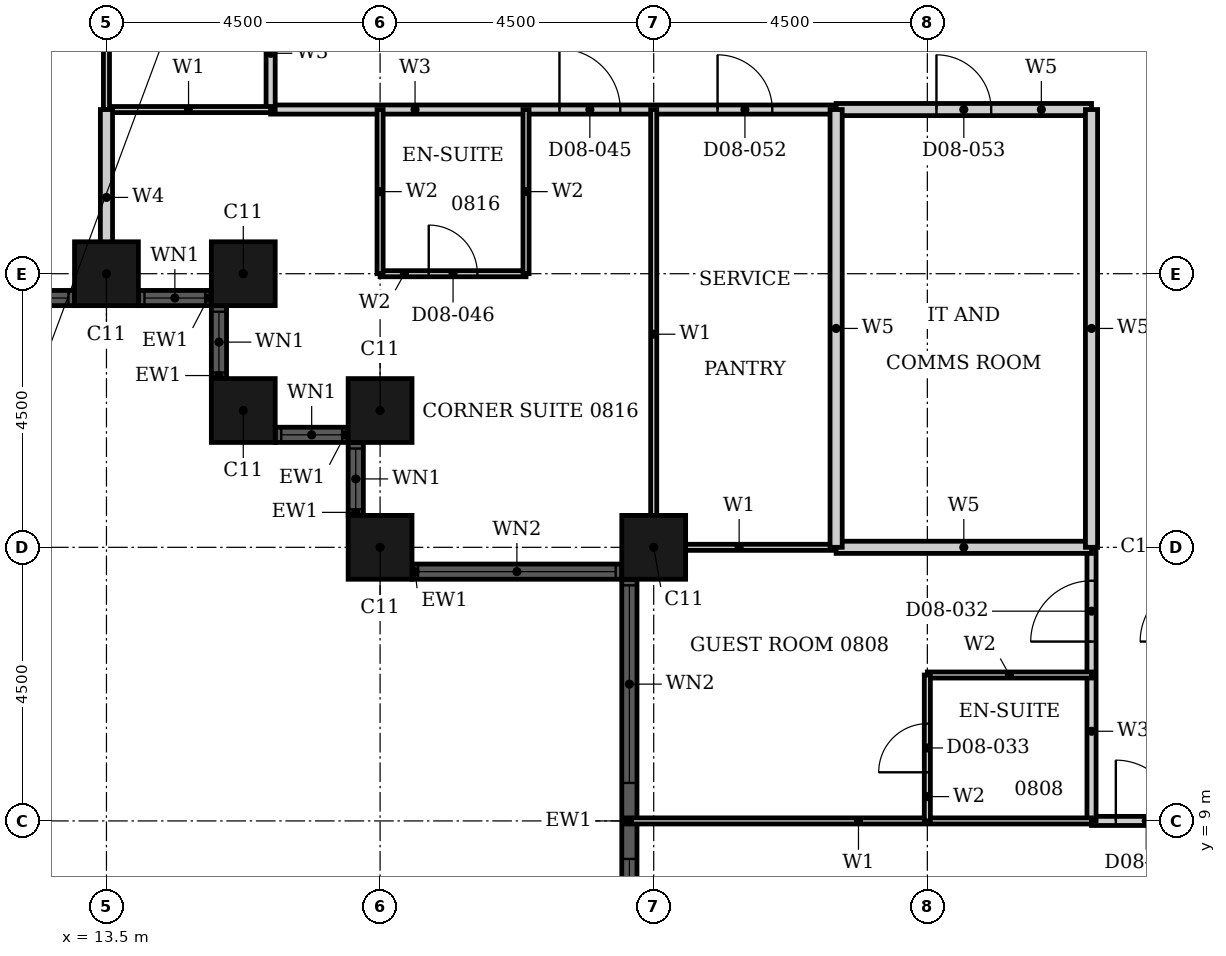
"""IFC4 building model, lengths in metres.
Left out: names, types, materials, properties, quantities, classifications, styles, units other than length and angle.
Written with IfcOpenShell. Run it as: python <this file> out.ifc"""

import sys

from ifc_helpers import new_model, si_unit, direction, frame, frame_2d, origin, origin_2d, place, context, subcontext, project, spatial, rectangle, hollow_rectangle, extrude, element, fill, save


model = new_model("IFC4")
c1 = context("Model", 3, precision=1e-05, world=origin(), true_north=direction((0.0, 1.0)))
c2 = subcontext(c1, "Body", "Model", "MODEL_VIEW")
j1 = project(units=[si_unit("LENGTHUNIT", "METRE"), si_unit("PLANEANGLEUNIT", "RADIAN")], contexts=[c1])
p1 = place(None, origin())
s1 = spatial("IfcSite", under=j1, at=p1, CompositionType="ELEMENT")
p2 = place(p1, origin())
s2 = spatial("IfcBuilding", under=s1, at=p2, CompositionType="ELEMENT")
p3 = place(p2, frame((0.0, 0.0, 40.8)))
s3 = spatial("IfcBuildingStorey", under=s2, at=p3, CompositionType="ELEMENT", Elevation=40.8)
for number, where, z_axis, x_axis in (
    (1, (13.5, 18.0, 0.0), (0.0, 0.0, 1.0), (1.0, 0.0, 0.0)),
    (2, (15.75, 18.0, 0.0), (0.0, 0.0, 1.0), (1.0, 0.0, 0.0)),
    (3, (15.75, 15.75, 0.0), (0.0, 0.0, 1.0), (1.0, 0.0, 0.0)),
    (4, (18.0, 15.75, 0.0), (0.0, 0.0, 1.0), (1.0, 0.0, 0.0)),
    (5, (18.0, 13.5, 0.0), (0.0, 0.0, 1.0), (1.0, 0.0, 0.0)),
    (6, (22.5, 13.5, 0.0), (0.0, 0.0, 1.0), (1.0, 0.0, 0.0)),
):
    element("IfcColumn", number, at=place(p3, frame(where, z_axis=z_axis, x_axis=x_axis)), inside=s3, PredefinedType="COLUMN", context=c2, shape_type="SweptSolid", body=[
        extrude(hollow_rectangle(XDim=1.05, YDim=1.05, WallThickness=0.034, at=origin_2d()), origin(), (0.0, 0.0, 1.0), 3.6),
    ])
p4 = place(p3, frame((5.025, 17.6, 0.0), z_axis=(0.0, 0.0, 1.0), x_axis=(1.0, 0.0, 0.0)))
e7 = element("IfcWall", 7, at=p4, inside=s3, PredefinedType="SOLIDWALL", context=c2, shape_type="SweptSolid", body=[
    extrude(rectangle(XDim=7.95, YDim=0.25, at=frame_2d((3.975, 0.0))), origin(), (0.0, 0.0, 1.0), 3.6),
])
p5 = place(p4, frame((0.1, 0.0, 0.9)))
e8 = element("IfcOpeningElement", 8, at=p5, cuts=e7, PredefinedType="OPENING", context=c2, shape_type="SweptSolid", body=[
    extrude(rectangle(XDim=3.25, YDim=2.08, at=frame_2d((1.625, 1.04))), frame((0.0, 0.135, 0.0), z_axis=(0.0, -1.0, 0.0), x_axis=(1.0, 0.0, 0.0)), (0.0, 0.0, 1.0), 0.27),
])
p6 = place(p4, frame((4.6, 0.0, 0.9)))
e9 = element("IfcOpeningElement", 9, at=p6, cuts=e7, PredefinedType="OPENING", context=c2, shape_type="SweptSolid", body=[
    extrude(rectangle(XDim=3.25, YDim=2.08, at=frame_2d((1.625, 1.04))), frame((0.0, 0.135, 0.0), z_axis=(0.0, -1.0, 0.0), x_axis=(1.0, 0.0, 0.0)), (0.0, 0.0, 1.0), 0.27),
])
p7 = place(p3, frame((14.025, 17.6, 0.0), z_axis=(0.0, 0.0, 1.0), x_axis=(1.0, 0.0, 0.0)))
e10 = element("IfcWall", 10, at=p7, inside=s3, PredefinedType="SOLIDWALL", context=c2, shape_type="SweptSolid", body=[
    extrude(rectangle(XDim=1.2, YDim=0.25, at=frame_2d((0.6, 0.0))), origin(), (0.0, 0.0, 1.0), 3.6),
])
p8 = place(p7, frame((0.1, 0.0, 0.9)))
e11 = element("IfcOpeningElement", 11, at=p8, cuts=e10, PredefinedType="OPENING", context=c2, shape_type="SweptSolid", body=[
    extrude(rectangle(XDim=1.0, YDim=2.08, at=frame_2d((0.5, 1.04))), frame((0.0, 0.135, 0.0), z_axis=(0.0, -1.0, 0.0), x_axis=(1.0, 0.0, 0.0)), (0.0, 0.0, 1.0), 0.27),
])
p9 = place(p3, frame((15.35, 17.475, 0.0), z_axis=(0.0, 0.0, 1.0), x_axis=(0.0, -1.0, 0.0)))
e12 = element("IfcWall", 12, at=p9, inside=s3, PredefinedType="SOLIDWALL", context=c2, shape_type="SweptSolid", body=[
    extrude(rectangle(XDim=1.2, YDim=0.25, at=frame_2d((0.6, 0.0))), origin(), (0.0, 0.0, 1.0), 3.6),
])
p10 = place(p9, frame((0.1, 0.0, 0.9)))
e13 = element("IfcOpeningElement", 13, at=p10, cuts=e12, PredefinedType="OPENING", context=c2, shape_type="SweptSolid", body=[
    extrude(rectangle(XDim=1.0, YDim=2.08, at=frame_2d((0.5, 1.04))), frame((0.0, 0.135, 0.0), z_axis=(0.0, -1.0, 0.0), x_axis=(1.0, 0.0, 0.0)), (0.0, 0.0, 1.0), 0.27),
])
p11 = place(p3, frame((16.275, 15.35, 0.0), z_axis=(0.0, 0.0, 1.0), x_axis=(1.0, 0.0, 0.0)))
e14 = element("IfcWall", 14, at=p11, inside=s3, PredefinedType="SOLIDWALL", context=c2, shape_type="SweptSolid", body=[
    extrude(rectangle(XDim=1.2, YDim=0.25, at=frame_2d((0.6, 0.0))), origin(), (0.0, 0.0, 1.0), 3.6),
])
p12 = place(p11, frame((0.1, 0.0, 0.9)))
e15 = element("IfcOpeningElement", 15, at=p12, cuts=e14, PredefinedType="OPENING", context=c2, shape_type="SweptSolid", body=[
    extrude(rectangle(XDim=1.0, YDim=2.08, at=frame_2d((0.5, 1.04))), frame((0.0, 0.135, 0.0), z_axis=(0.0, -1.0, 0.0), x_axis=(1.0, 0.0, 0.0)), (0.0, 0.0, 1.0), 0.27),
])
p13 = place(p3, frame((17.6, 15.225, 0.0), z_axis=(0.0, 0.0, 1.0), x_axis=(0.0, -1.0, 0.0)))
e16 = element("IfcWall", 16, at=p13, inside=s3, PredefinedType="SOLIDWALL", context=c2, shape_type="SweptSolid", body=[
    extrude(rectangle(XDim=1.2, YDim=0.25, at=frame_2d((0.6, 0.0))), origin(), (0.0, 0.0, 1.0), 3.6),
])
p14 = place(p13, frame((0.1, 0.0, 0.9)))
e17 = element("IfcOpeningElement", 17, at=p14, cuts=e16, PredefinedType="OPENING", context=c2, shape_type="SweptSolid", body=[
    extrude(rectangle(XDim=1.0, YDim=2.08, at=frame_2d((0.5, 1.04))), frame((0.0, 0.135, 0.0), z_axis=(0.0, -1.0, 0.0), x_axis=(1.0, 0.0, 0.0)), (0.0, 0.0, 1.0), 0.27),
])
p15 = place(p3, frame((18.525, 13.1, 0.0), z_axis=(0.0, 0.0, 1.0), x_axis=(1.0, 0.0, 0.0)))
e18 = element("IfcWall", 18, at=p15, inside=s3, PredefinedType="SOLIDWALL", context=c2, shape_type="SweptSolid", body=[
    extrude(rectangle(XDim=3.45, YDim=0.25, at=frame_2d((1.725, 0.0))), origin(), (0.0, 0.0, 1.0), 3.6),
])
p16 = place(p15, frame((0.1, 0.0, 0.9)))
e19 = element("IfcOpeningElement", 19, at=p16, cuts=e18, PredefinedType="OPENING", context=c2, shape_type="SweptSolid", body=[
    extrude(rectangle(XDim=3.25, YDim=2.08, at=frame_2d((1.625, 1.04))), frame((0.0, 0.135, 0.0), z_axis=(0.0, -1.0, 0.0), x_axis=(1.0, 0.0, 0.0)), (0.0, 0.0, 1.0), 0.27),
])
p17 = place(p3, frame((22.1, 12.975, 0.0), z_axis=(0.0, 0.0, 1.0), x_axis=(0.0, -1.0, 0.0)))
e20 = element("IfcWall", 20, at=p17, inside=s3, PredefinedType="SOLIDWALL", context=c2, shape_type="SweptSolid", body=[
    extrude(rectangle(XDim=7.95, YDim=0.25, at=frame_2d((3.975, 0.0))), origin(), (0.0, 0.0, 1.0), 3.6),
])
p18 = place(p17, frame((0.1, 0.0, 0.9)))
e21 = element("IfcOpeningElement", 21, at=p18, cuts=e20, PredefinedType="OPENING", context=c2, shape_type="SweptSolid", body=[
    extrude(rectangle(XDim=3.25, YDim=2.08, at=frame_2d((1.625, 1.04))), frame((0.0, 0.135, 0.0), z_axis=(0.0, -1.0, 0.0), x_axis=(1.0, 0.0, 0.0)), (0.0, 0.0, 1.0), 0.27),
])
p19 = place(p17, frame((4.6, 0.0, 0.9)))
e22 = element("IfcOpeningElement", 22, at=p19, cuts=e20, PredefinedType="OPENING", context=c2, shape_type="SweptSolid", body=[
    extrude(rectangle(XDim=3.25, YDim=2.08, at=frame_2d((1.625, 1.04))), frame((0.0, 0.135, 0.0), z_axis=(0.0, -1.0, 0.0), x_axis=(1.0, 0.0, 0.0)), (0.0, 0.0, 1.0), 0.27),
])
p20 = place(p3, frame((16.2, 20.7, 0.0), z_axis=(0.0, 0.0, 1.0), x_axis=(1.0, 0.0, 0.0)))
e23 = element("IfcWall", 23, at=p20, inside=s3, PredefinedType="PARTITIONING", context=c2, shape_type="SweptSolid", body=[
    extrude(rectangle(XDim=9.3, YDim=0.15, at=frame_2d((4.65, 0.0))), origin(), (0.0, 0.0, 1.0), 3.3),
])
p21 = place(p20, frame((4.75, 0.0, 0.0)))
e24 = element("IfcOpeningElement", 24, at=p21, cuts=e23, PredefinedType="OPENING", context=c2, shape_type="SweptSolid", body=[
    extrude(rectangle(XDim=1.0, YDim=2.1, at=frame_2d((0.5, 1.05))), frame((0.0, 0.085, 0.0), z_axis=(0.0, -1.0, 0.0), x_axis=(1.0, 0.0, 0.0)), (0.0, 0.0, 1.0), 0.17),
])
p22 = place(p20, frame((7.35, 0.0, 0.0)))
e25 = element("IfcOpeningElement", 25, at=p22, cuts=e23, PredefinedType="OPENING", context=c2, shape_type="SweptSolid", body=[
    extrude(rectangle(XDim=0.9, YDim=2.1, at=frame_2d((0.45, 1.05))), frame((0.0, 0.085, 0.0), z_axis=(0.0, -1.0, 0.0), x_axis=(1.0, 0.0, 0.0)), (0.0, 0.0, 1.0), 0.17),
])
p23 = place(p3, frame((29.7, 9.0, 0.0), z_axis=(0.0, 0.0, 1.0), x_axis=(1.0, 0.0, 0.0)))
e26 = element("IfcWall", 26, at=p23, inside=s3, PredefinedType="PARTITIONING", context=c2, shape_type="SweptSolid", body=[
    extrude(rectangle(XDim=1.8, YDim=0.15, at=frame_2d((0.9, 0.0))), origin(), (0.0, 0.0, 1.0), 3.3),
])
p24 = place(p23, frame((0.4, 0.0, 0.0)))
e27 = element("IfcOpeningElement", 27, at=p24, cuts=e26, PredefinedType="OPENING", context=c2, shape_type="SweptSolid", body=[
    extrude(rectangle(XDim=1.0, YDim=2.1, at=frame_2d((0.5, 1.05))), frame((0.0, 0.085, 0.0), z_axis=(0.0, -1.0, 0.0), x_axis=(1.0, 0.0, 0.0)), (0.0, 0.0, 1.0), 0.17),
])
p25 = place(p3, frame((16.2, 20.7, 0.0), z_axis=(0.0, 0.0, 1.0), x_axis=(0.0, 1.0, 0.0)))
e28 = element("IfcWall", 28, at=p25, inside=s3, PredefinedType="PARTITIONING", context=c2, shape_type="SweptSolid", body=[
    extrude(rectangle(XDim=4.5, YDim=0.15, at=frame_2d((2.25, 0.0))), origin(), (0.0, 0.0, 1.0), 3.3),
])
p26 = place(p25, frame((1.85, 0.0, 0.0)))
e29 = element("IfcOpeningElement", 29, at=p26, cuts=e28, PredefinedType="OPENING", context=c2, shape_type="SweptSolid", body=[
    extrude(rectangle(XDim=0.9, YDim=2.1, at=frame_2d((0.45, 1.05))), frame((0.0, 0.085, 0.0), z_axis=(0.0, -1.0, 0.0), x_axis=(1.0, 0.0, 0.0)), (0.0, 0.0, 1.0), 0.17),
])
p27 = place(p3, frame((29.7, 9.0, 0.0), z_axis=(0.0, 0.0, 1.0), x_axis=(0.0, 1.0, 0.0)))
e30 = element("IfcWall", 30, at=p27, inside=s3, PredefinedType="PARTITIONING", context=c2, shape_type="SweptSolid", body=[
    extrude(rectangle(XDim=4.5, YDim=0.15, at=frame_2d((2.25, 0.0))), origin(), (0.0, 0.0, 1.0), 3.3),
])
p28 = place(p27, frame((2.95, 0.0, 0.0)))
e31 = element("IfcOpeningElement", 31, at=p28, cuts=e30, PredefinedType="OPENING", context=c2, shape_type="SweptSolid", body=[
    extrude(rectangle(XDim=1.0, YDim=2.1, at=frame_2d((0.5, 1.05))), frame((0.0, 0.085, 0.0), z_axis=(0.0, -1.0, 0.0), x_axis=(1.0, 0.0, 0.0)), (0.0, 0.0, 1.0), 0.17),
])
p29 = place(p3, frame((22.31, 13.5, 0.0), z_axis=(0.0, 0.0, 1.0), x_axis=(1.0, 0.0, 0.0)))
e32 = element("IfcWall", 32, at=p29, inside=s3, PredefinedType="PARTITIONING", context=c2, shape_type="SweptSolid", body=[
    extrude(rectangle(XDim=3.19, YDim=0.1, at=frame_2d((1.595, 0.0))), origin(), (0.0, 0.0, 1.0), 2.38),
])
p30 = place(p3, frame((13.5, 20.7, 0.0), z_axis=(0.0, 0.0, 1.0), x_axis=(1.0, 0.0, 0.0)))
e33 = element("IfcWall", 33, at=p30, inside=s3, PredefinedType="PARTITIONING", context=c2, shape_type="SweptSolid", body=[
    extrude(rectangle(XDim=2.7, YDim=0.1, at=frame_2d((1.35, 0.0))), origin(), (0.0, 0.0, 1.0), 3.3),
])
p31 = place(p3, frame((22.035, 9.0, 0.0), z_axis=(0.0, 0.0, 1.0), x_axis=(1.0, 0.0, 0.0)))
e34 = element("IfcWall", 34, at=p31, inside=s3, PredefinedType="PARTITIONING", context=c2, shape_type="SweptSolid", body=[
    extrude(rectangle(XDim=7.665, YDim=0.1, at=frame_2d((3.833, 0.0))), origin(), (0.0, 0.0, 1.0), 3.3),
])
p32 = place(p3, frame((13.5, 20.7, 0.0), z_axis=(0.0, 0.0, 1.0), x_axis=(0.0, 1.0, 0.0)))
e35 = element("IfcWall", 35, at=p32, inside=s3, PredefinedType="PARTITIONING", context=c2, shape_type="SweptSolid", body=[
    extrude(rectangle(XDim=4.5, YDim=0.1, at=frame_2d((2.25, 0.0))), origin(), (0.0, 0.0, 1.0), 2.38),
])
p33 = place(p3, frame((22.5, 13.31, 0.0), z_axis=(0.0, 0.0, 1.0), x_axis=(0.0, 1.0, 0.0)))
e36 = element("IfcWall", 36, at=p33, inside=s3, PredefinedType="PARTITIONING", context=c2, shape_type="SweptSolid", body=[
    extrude(rectangle(XDim=7.39, YDim=0.1, at=frame_2d((3.695, 0.0))), origin(), (0.0, 0.0, 1.0), 3.3),
])
p34 = place(p3, frame((13.5, 17.81, 0.0), z_axis=(0.0, 0.0, 1.0), x_axis=(0.0, 1.0, 0.0)))
e37 = element("IfcWall", 37, at=p34, inside=s3, PredefinedType="PARTITIONING", context=c2, shape_type="SweptSolid", body=[
    extrude(rectangle(XDim=2.89, YDim=0.2, at=frame_2d((1.445, 0.0))), origin(), (0.0, 0.0, 1.0), 2.38),
])
p35 = place(p3, frame((27.0, 11.4, 0.0), z_axis=(0.0, 0.0, 1.0), x_axis=(1.0, 0.0, 0.0)))
e38 = element("IfcWall", 38, at=p35, inside=s3, PredefinedType="PARTITIONING", context=c2, shape_type="SweptSolid", body=[
    extrude(rectangle(XDim=2.7, YDim=0.1, at=frame_2d((1.35, 0.0))), origin(), (0.0, 0.0, 1.0), 3.3),
])
p36 = place(p3, frame((18.0, 18.0, 0.0), z_axis=(0.0, 0.0, 1.0), x_axis=(1.0, 0.0, 0.0)))
e39 = element("IfcWall", 39, at=p36, inside=s3, PredefinedType="PARTITIONING", context=c2, shape_type="SweptSolid", body=[
    extrude(rectangle(XDim=2.4, YDim=0.1, at=frame_2d((1.2, 0.0))), origin(), (0.0, 0.0, 1.0), 3.3),
])
p37 = place(p36, frame((0.8, 0.0, 0.0)))
e40 = element("IfcOpeningElement", 40, at=p37, cuts=e39, PredefinedType="OPENING", context=c2, shape_type="SweptSolid", body=[
    extrude(rectangle(XDim=0.8, YDim=2.1, at=frame_2d((0.4, 1.05))), frame((0.0, 0.06, 0.0), z_axis=(0.0, -1.0, 0.0), x_axis=(1.0, 0.0, 0.0)), (0.0, 0.0, 1.0), 0.12),
])
for number, where, z_axis, x_axis in (
    (41, (18.0, 18.0, 0.0), (0.0, 0.0, 1.0), (0.0, 1.0, 0.0)),
    (42, (20.4, 18.0, 0.0), (0.0, 0.0, 1.0), (0.0, 1.0, 0.0)),
):
    element("IfcWall", number, at=place(p3, frame(where, z_axis=z_axis, x_axis=x_axis)), inside=s3, PredefinedType="PARTITIONING", context=c2, shape_type="SweptSolid", body=[
        extrude(rectangle(XDim=2.7, YDim=0.1, at=frame_2d((1.35, 0.0))), origin(), (0.0, 0.0, 1.0), 3.3),
    ])
p38 = place(p3, frame((27.0, 9.0, 0.0), z_axis=(0.0, 0.0, 1.0), x_axis=(0.0, 1.0, 0.0)))
e43 = element("IfcWall", 43, at=p38, inside=s3, PredefinedType="PARTITIONING", context=c2, shape_type="SweptSolid", body=[
    extrude(rectangle(XDim=2.4, YDim=0.1, at=frame_2d((1.2, 0.0))), origin(), (0.0, 0.0, 1.0), 2.58),
])
p39 = place(p38, frame((0.8, 0.0, 0.0)))
e44 = element("IfcOpeningElement", 44, at=p39, cuts=e43, PredefinedType="OPENING", context=c2, shape_type="SweptSolid", body=[
    extrude(rectangle(XDim=0.8, YDim=2.1, at=frame_2d((0.4, 1.05))), frame((0.0, 0.06, 0.0), z_axis=(0.0, -1.0, 0.0), x_axis=(1.0, 0.0, 0.0)), (0.0, 0.0, 1.0), 0.12),
])
p40 = place(p3, frame((25.5, 13.5, 0.0), z_axis=(0.0, 0.0, 1.0), x_axis=(1.0, 0.0, 0.0)))
e45 = element("IfcWall", 45, at=p40, inside=s3, PredefinedType="PARTITIONING", context=c2, shape_type="SweptSolid", body=[
    extrude(rectangle(XDim=4.2, YDim=0.2, at=frame_2d((2.1, 0.0))), origin(), (0.0, 0.0, 1.0), 2.38),
])
p41 = place(p3, frame((25.5, 20.7, 0.0), z_axis=(0.0, 0.0, 1.0), x_axis=(1.0, 0.0, 0.0)))
e46 = element("IfcWall", 46, at=p41, inside=s3, PredefinedType="PARTITIONING", context=c2, shape_type="SweptSolid", body=[
    extrude(rectangle(XDim=4.2, YDim=0.2, at=frame_2d((2.1, 0.0))), origin(), (0.0, 0.0, 1.0), 3.3),
])
p42 = place(p41, frame((1.65, 0.0, 0.0)))
e47 = element("IfcOpeningElement", 47, at=p42, cuts=e46, PredefinedType="OPENING", context=c2, shape_type="SweptSolid", body=[
    extrude(rectangle(XDim=0.9, YDim=2.1, at=frame_2d((0.45, 1.05))), frame((0.0, 0.11, 0.0), z_axis=(0.0, -1.0, 0.0), x_axis=(1.0, 0.0, 0.0)), (0.0, 0.0, 1.0), 0.22),
])
for number, where, z_axis, x_axis in (
    (48, (25.5, 13.5, 0.0), (0.0, 0.0, 1.0), (0.0, 1.0, 0.0)),
    (49, (29.7, 13.5, 0.0), (0.0, 0.0, 1.0), (0.0, 1.0, 0.0)),
):
    element("IfcWall", number, at=place(p3, frame(where, z_axis=z_axis, x_axis=x_axis)), inside=s3, PredefinedType="PARTITIONING", context=c2, shape_type="SweptSolid", body=[
        extrude(rectangle(XDim=7.2, YDim=0.2, at=frame_2d((3.6, 0.0))), origin(), (0.0, 0.0, 1.0), 3.3),
    ])
p43 = place(p6, origin())
e50 = element("IfcWindow", 50, at=p43, inside=s3, PartitioningType="SINGLE_PANEL", PredefinedType="WINDOW", context=c2, shape_type="SweptSolid", body=[
    extrude(rectangle(XDim=3.25, YDim=2.08, at=frame_2d((1.625, 1.04))), frame((0.0, 0.03, 0.0), z_axis=(0.0, -1.0, 0.0), x_axis=(1.0, 0.0, 0.0)), (0.0, 0.0, 1.0), 0.06),
])
fill(e9, e50)
p44 = place(p8, origin())
e51 = element("IfcWindow", 51, at=p44, inside=s3, PartitioningType="SINGLE_PANEL", PredefinedType="WINDOW", context=c2, shape_type="SweptSolid", body=[
    extrude(rectangle(XDim=1.0, YDim=2.08, at=frame_2d((0.5, 1.04))), frame((0.0, 0.03, 0.0), z_axis=(0.0, -1.0, 0.0), x_axis=(1.0, 0.0, 0.0)), (0.0, 0.0, 1.0), 0.06),
])
fill(e11, e51)
p45 = place(p10, origin())
e52 = element("IfcWindow", 52, at=p45, inside=s3, PartitioningType="SINGLE_PANEL", PredefinedType="WINDOW", context=c2, shape_type="SweptSolid", body=[
    extrude(rectangle(XDim=1.0, YDim=2.08, at=frame_2d((0.5, 1.04))), frame((0.0, 0.03, 0.0), z_axis=(0.0, -1.0, 0.0), x_axis=(1.0, 0.0, 0.0)), (0.0, 0.0, 1.0), 0.06),
])
fill(e13, e52)
p46 = place(p12, origin())
e53 = element("IfcWindow", 53, at=p46, inside=s3, PartitioningType="SINGLE_PANEL", PredefinedType="WINDOW", context=c2, shape_type="SweptSolid", body=[
    extrude(rectangle(XDim=1.0, YDim=2.08, at=frame_2d((0.5, 1.04))), frame((0.0, 0.03, 0.0), z_axis=(0.0, -1.0, 0.0), x_axis=(1.0, 0.0, 0.0)), (0.0, 0.0, 1.0), 0.06),
])
fill(e15, e53)
p47 = place(p14, origin())
e54 = element("IfcWindow", 54, at=p47, inside=s3, PartitioningType="SINGLE_PANEL", PredefinedType="WINDOW", context=c2, shape_type="SweptSolid", body=[
    extrude(rectangle(XDim=1.0, YDim=2.08, at=frame_2d((0.5, 1.04))), frame((0.0, 0.03, 0.0), z_axis=(0.0, -1.0, 0.0), x_axis=(1.0, 0.0, 0.0)), (0.0, 0.0, 1.0), 0.06),
])
fill(e17, e54)
p48 = place(p16, origin())
e55 = element("IfcWindow", 55, at=p48, inside=s3, PartitioningType="SINGLE_PANEL", PredefinedType="WINDOW", context=c2, shape_type="SweptSolid", body=[
    extrude(rectangle(XDim=3.25, YDim=2.08, at=frame_2d((1.625, 1.04))), frame((0.0, 0.03, 0.0), z_axis=(0.0, -1.0, 0.0), x_axis=(1.0, 0.0, 0.0)), (0.0, 0.0, 1.0), 0.06),
])
fill(e19, e55)
p49 = place(p18, origin())
e56 = element("IfcWindow", 56, at=p49, inside=s3, PartitioningType="SINGLE_PANEL", PredefinedType="WINDOW", context=c2, shape_type="SweptSolid", body=[
    extrude(rectangle(XDim=3.25, YDim=2.08, at=frame_2d((1.625, 1.04))), frame((0.0, 0.03, 0.0), z_axis=(0.0, -1.0, 0.0), x_axis=(1.0, 0.0, 0.0)), (0.0, 0.0, 1.0), 0.06),
])
fill(e21, e56)
p50 = place(p19, origin())
e57 = element("IfcWindow", 57, at=p50, inside=s3, PartitioningType="SINGLE_PANEL", PredefinedType="WINDOW", context=c2, shape_type="SweptSolid", body=[
    extrude(rectangle(XDim=3.25, YDim=2.08, at=frame_2d((1.625, 1.04))), frame((0.0, 0.03, 0.0), z_axis=(0.0, -1.0, 0.0), x_axis=(1.0, 0.0, 0.0)), (0.0, 0.0, 1.0), 0.06),
])
fill(e22, e57)
p51 = place(p28, origin())
e58 = element("IfcDoor", 58, at=p51, inside=s3, OperationType="SINGLE_SWING_RIGHT", PredefinedType="DOOR", context=c2, shape_type="SweptSolid", body=[
    extrude(rectangle(XDim=1.0, YDim=2.1, at=frame_2d((0.5, 1.05))), frame((0.0, 0.025, 0.0), z_axis=(0.0, -1.0, 0.0), x_axis=(1.0, 0.0, 0.0)), (0.0, 0.0, 1.0), 0.05),
])
fill(e31, e58)
p52 = place(p39, origin())
e59 = element("IfcDoor", 59, at=p52, inside=s3, OperationType="SINGLE_SWING_LEFT", PredefinedType="DOOR", context=c2, shape_type="SweptSolid", body=[
    extrude(rectangle(XDim=0.8, YDim=2.1, at=frame_2d((0.4, 1.05))), frame((0.0, 0.025, 0.0), z_axis=(0.0, -1.0, 0.0), x_axis=(1.0, 0.0, 0.0)), (0.0, 0.0, 1.0), 0.05),
])
fill(e44, e59)
p53 = place(p24, origin())
e60 = element("IfcDoor", 60, at=p53, inside=s3, OperationType="SINGLE_SWING_RIGHT", PredefinedType="DOOR", context=c2, shape_type="SweptSolid", body=[
    extrude(rectangle(XDim=1.0, YDim=2.1, at=frame_2d((0.5, 1.05))), frame((0.0, 0.025, 0.0), z_axis=(0.0, -1.0, 0.0), x_axis=(1.0, 0.0, 0.0)), (0.0, 0.0, 1.0), 0.05),
])
fill(e27, e60)
p54 = place(p21, origin())
e61 = element("IfcDoor", 61, at=p54, inside=s3, OperationType="SINGLE_SWING_RIGHT", PredefinedType="DOOR", context=c2, shape_type="SweptSolid", body=[
    extrude(rectangle(XDim=1.0, YDim=2.1, at=frame_2d((0.5, 1.05))), frame((0.0, 0.025, 0.0), z_axis=(0.0, -1.0, 0.0), x_axis=(1.0, 0.0, 0.0)), (0.0, 0.0, 1.0), 0.05),
])
fill(e24, e61)
p55 = place(p37, origin())
e62 = element("IfcDoor", 62, at=p55, inside=s3, OperationType="SINGLE_SWING_RIGHT", PredefinedType="DOOR", context=c2, shape_type="SweptSolid", body=[
    extrude(rectangle(XDim=0.8, YDim=2.1, at=frame_2d((0.4, 1.05))), frame((0.0, 0.025, 0.0), z_axis=(0.0, -1.0, 0.0), x_axis=(1.0, 0.0, 0.0)), (0.0, 0.0, 1.0), 0.05),
])
fill(e40, e62)
p56 = place(p22, origin())
e63 = element("IfcDoor", 63, at=p56, inside=s3, OperationType="SINGLE_SWING_LEFT", PredefinedType="DOOR", context=c2, shape_type="SweptSolid", body=[
    extrude(rectangle(XDim=0.9, YDim=2.1, at=frame_2d((0.45, 1.05))), frame((0.0, 0.025, 0.0), z_axis=(0.0, -1.0, 0.0), x_axis=(1.0, 0.0, 0.0)), (0.0, 0.0, 1.0), 0.05),
])
fill(e25, e63)
p57 = place(p42, origin())
e64 = element("IfcDoor", 64, at=p57, inside=s3, OperationType="SINGLE_SWING_RIGHT", PredefinedType="DOOR", context=c2, shape_type="SweptSolid", body=[
    extrude(rectangle(XDim=0.9, YDim=2.1, at=frame_2d((0.45, 1.05))), frame((0.0, 0.025, 0.0), z_axis=(0.0, -1.0, 0.0), x_axis=(1.0, 0.0, 0.0)), (0.0, 0.0, 1.0), 0.05),
])
fill(e47, e64)
save(model, sys.argv[1])
